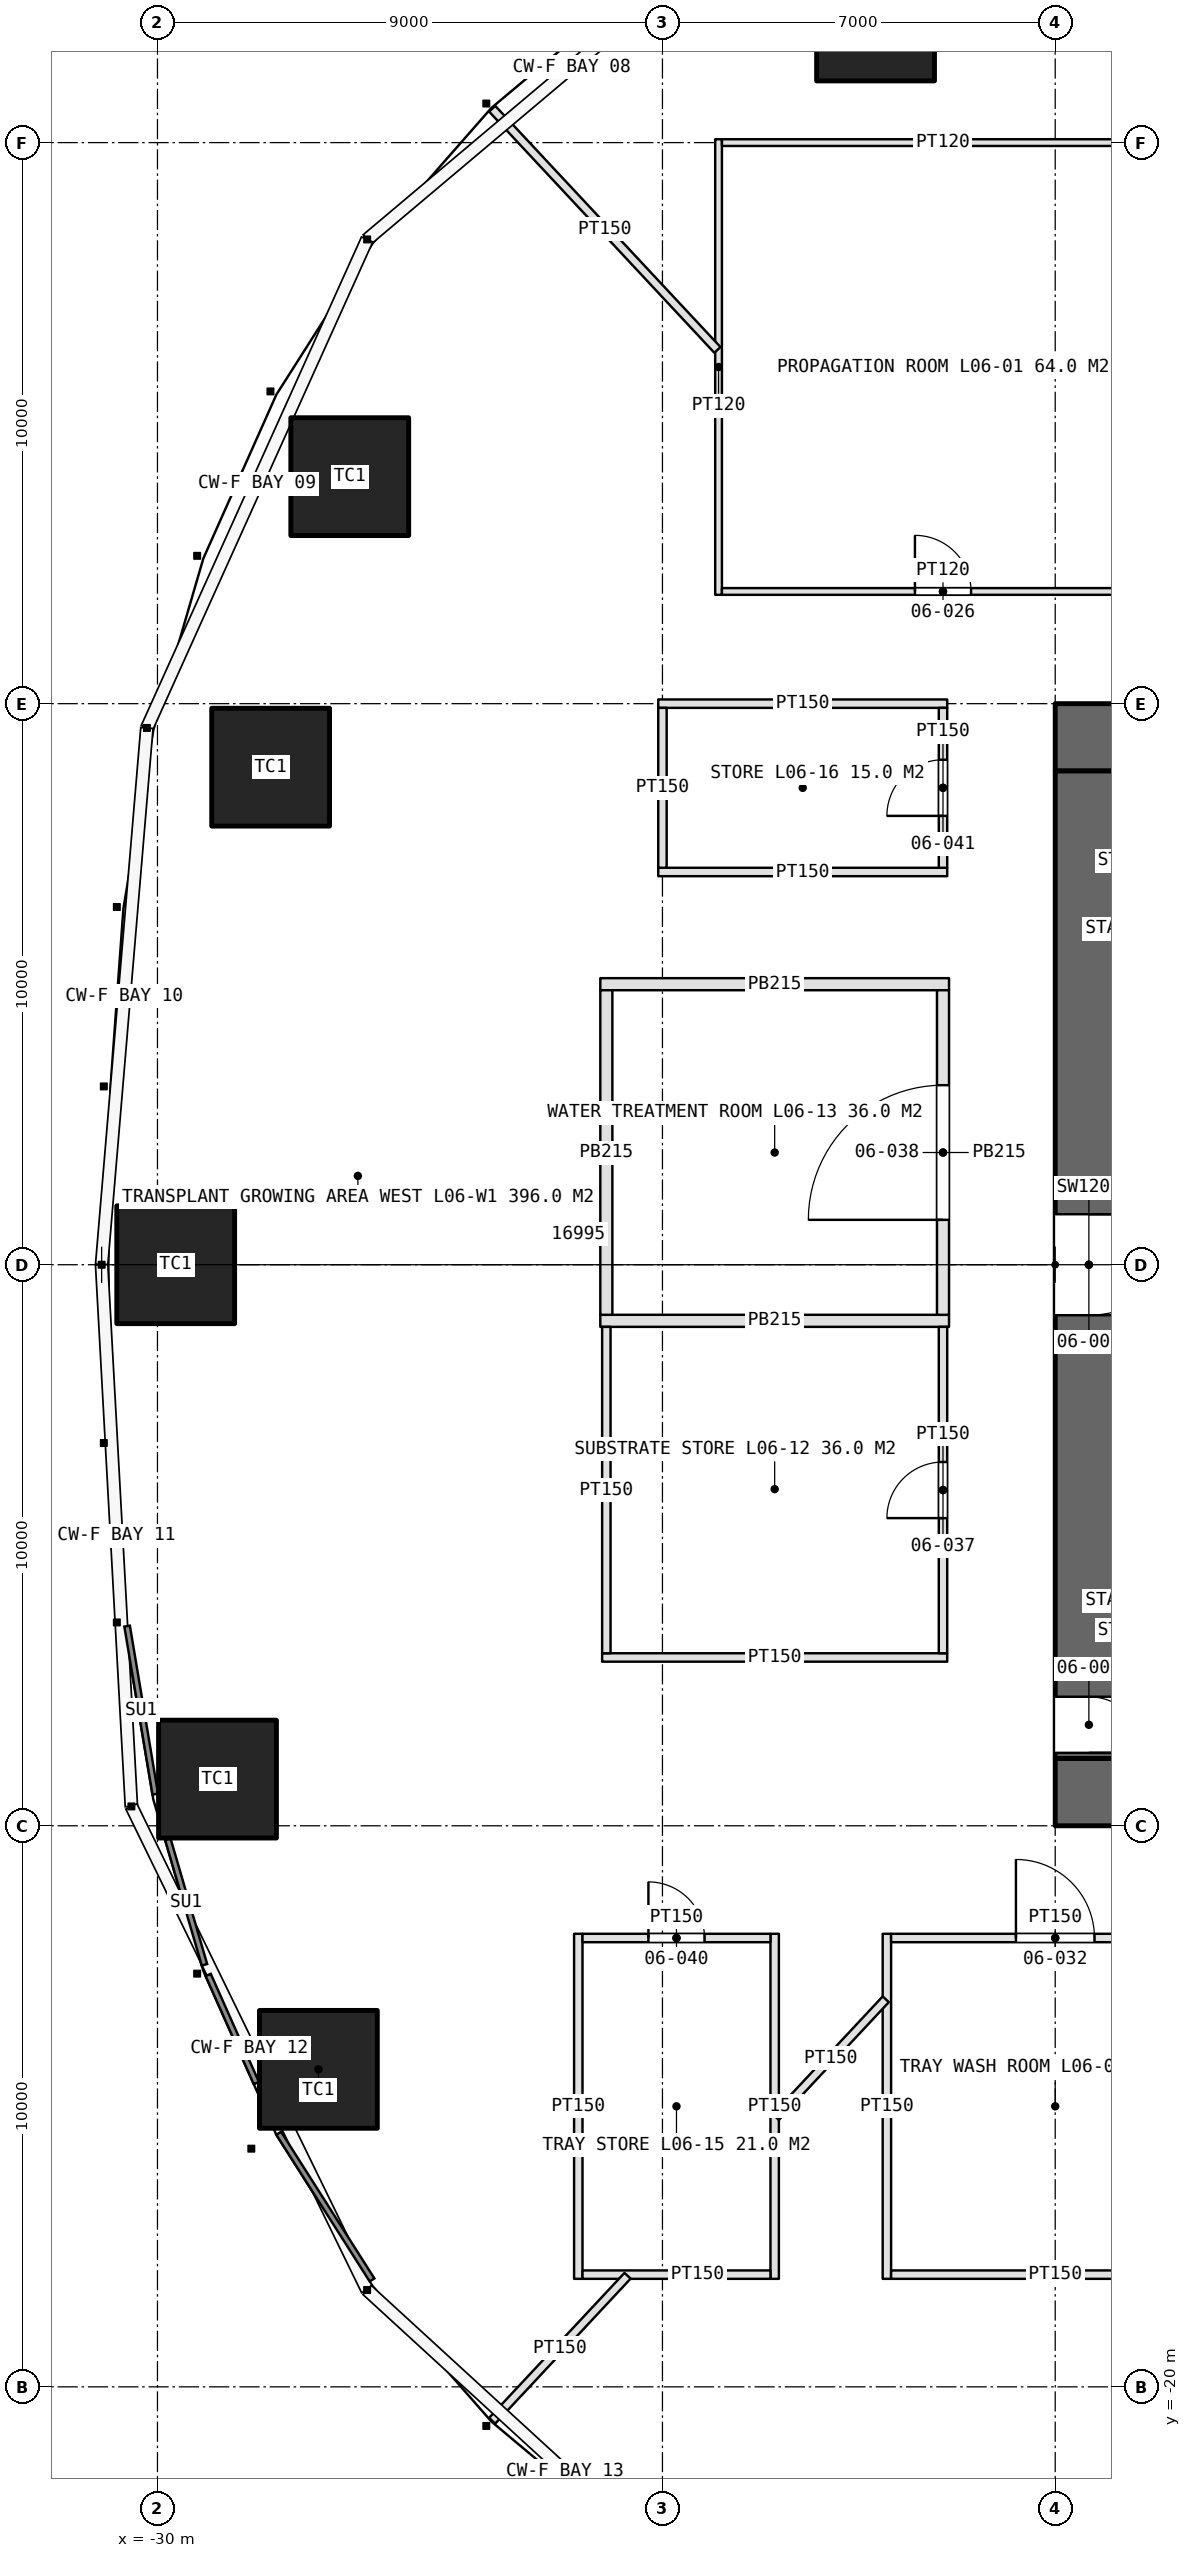
"""IFC4 building model, lengths in metres.
Left out: names, types, materials, properties, quantities, classifications, styles, units other than length and angle.
Written with IfcOpenShell. Run it as: python <this file> out.ifc"""

import sys

from ifc_helpers import new_model, si_unit, direction, frame, frame_2d, origin, origin_2d, place, context, subcontext, project, spatial, rectangle, extrude, element, fill, save


model = new_model("IFC4")
c1 = context("Model", 3, precision=1e-05, world=origin(), true_north=direction((0.0, 1.0)))
c2 = subcontext(c1, "Body", "Model", "MODEL_VIEW")
j1 = project(units=[si_unit("LENGTHUNIT", "METRE"), si_unit("PLANEANGLEUNIT", "RADIAN")], contexts=[c1])
p1 = place(None, origin())
s1 = spatial("IfcSite", under=j1, at=p1, CompositionType="ELEMENT")
p2 = place(p1, origin())
s2 = spatial("IfcBuilding", under=s1, at=p2, CompositionType="ELEMENT")
p3 = place(p2, frame((0.0, 0.0, 30.0)))
s3 = spatial("IfcBuildingStorey", under=s2, at=p3, CompositionType="ELEMENT", Elevation=30.0)
p4 = place(p3, frame((-14.0, -9.4, 0.0), z_axis=(0.0, 0.0, 1.0), x_axis=(1.0, 0.0, 0.0)))
e1 = element("IfcWall", 1, at=p4, inside=s3, PredefinedType="SHEAR", context=c2, shape_type="SweptSolid", body=[
    extrude(rectangle(XDim=28.0, YDim=1.2, at=frame_2d((14.0, 0.0))), origin(), (0.0, 0.0, 1.0), 5.0),
])
p5 = place(p4, frame((13.1, 0.0, 0.0)))
e2 = element("IfcOpeningElement", 2, at=p5, cuts=e1, PredefinedType="OPENING", context=c2, shape_type="SweptSolid", body=[
    extrude(rectangle(XDim=1.8, YDim=2.4, at=frame_2d((0.9, 1.2))), frame((0.0, 0.61, 0.0), z_axis=(0.0, -1.0, 0.0), x_axis=(1.0, 0.0, 0.0)), (0.0, 0.0, 1.0), 1.22),
])
p6 = place(p4, frame((22.9, 0.0, 0.0)))
e3 = element("IfcOpeningElement", 3, at=p6, cuts=e1, PredefinedType="OPENING", context=c2, shape_type="SweptSolid", body=[
    extrude(rectangle(XDim=2.2, YDim=2.7, at=frame_2d((1.1, 1.35))), frame((0.0, 0.61, 0.0), z_axis=(0.0, -1.0, 0.0), x_axis=(1.0, 0.0, 0.0)), (0.0, 0.0, 1.0), 1.22),
])
p7 = place(p3, frame((14.0, 9.4, 0.0), z_axis=(0.0, 0.0, 1.0), x_axis=(-1.0, 0.0, 0.0)))
e4 = element("IfcWall", 4, at=p7, inside=s3, PredefinedType="SHEAR", context=c2, shape_type="SweptSolid", body=[
    extrude(rectangle(XDim=28.0, YDim=1.2, at=frame_2d((14.0, 0.0))), origin(), (0.0, 0.0, 1.0), 5.0),
])
p8 = place(p7, frame((24.0, 0.0, 0.0)))
e5 = element("IfcOpeningElement", 5, at=p8, cuts=e4, PredefinedType="OPENING", context=c2, shape_type="SweptSolid", body=[
    extrude(rectangle(XDim=1.0, YDim=2.4, at=frame_2d((0.5, 1.2))), frame((0.0, 0.61, 0.0), z_axis=(0.0, -1.0, 0.0), x_axis=(1.0, 0.0, 0.0)), (0.0, 0.0, 1.0), 1.22),
])
p9 = place(p7, frame((13.1, 0.0, 0.0)))
e6 = element("IfcOpeningElement", 6, at=p9, cuts=e4, PredefinedType="OPENING", context=c2, shape_type="SweptSolid", body=[
    extrude(rectangle(XDim=1.8, YDim=2.4, at=frame_2d((0.9, 1.2))), frame((0.0, 0.61, 0.0), z_axis=(0.0, -1.0, 0.0), x_axis=(1.0, 0.0, 0.0)), (0.0, 0.0, 1.0), 1.22),
])
p10 = place(p3, frame((-13.4, 8.8, 0.0), z_axis=(0.0, 0.0, 1.0), x_axis=(0.0, -1.0, 0.0)))
e7 = element("IfcWall", 7, at=p10, inside=s3, PredefinedType="SHEAR", context=c2, shape_type="SweptSolid", body=[
    extrude(rectangle(XDim=17.6, YDim=1.2, at=frame_2d((8.8, 0.0))), origin(), (0.0, 0.0, 1.0), 5.0),
])
p11 = place(p10, frame((7.9, 0.0, 0.0)))
e8 = element("IfcOpeningElement", 8, at=p11, cuts=e7, PredefinedType="OPENING", context=c2, shape_type="SweptSolid", body=[
    extrude(rectangle(XDim=1.8, YDim=2.4, at=frame_2d((0.9, 1.2))), frame((0.0, 0.61, 0.0), z_axis=(0.0, -1.0, 0.0), x_axis=(1.0, 0.0, 0.0)), (0.0, 0.0, 1.0), 1.22),
])
p12 = place(p10, frame((16.5, 0.0, 0.0)))
e9 = element("IfcOpeningElement", 9, at=p12, cuts=e7, PredefinedType="OPENING", context=c2, shape_type="SweptSolid", body=[
    extrude(rectangle(XDim=1.0, YDim=2.4, at=frame_2d((0.5, 1.2))), frame((0.0, 0.61, 0.0), z_axis=(0.0, -1.0, 0.0), x_axis=(1.0, 0.0, 0.0)), (0.0, 0.0, 1.0), 1.22),
])
for number, where, z_axis, x_axis in (
    (10, (-17.202, 22.15, 0.0), (0.0, 0.0, 1.0), (1.0, 0.0, 0.0)),
    (11, (-26.573, 14.046, 0.0), (0.0, 0.0, 1.0), (1.0, 0.0, 0.0)),
    (12, (-27.983, 8.868, 0.0), (0.0, 0.0, 1.0), (1.0, 0.0, 0.0)),
    (13, (-29.675, 0.0, 0.0), (0.0, 0.0, 1.0), (1.0, 0.0, 0.0)),
    (14, (-28.93, -9.168, 0.0), (0.0, 0.0, 1.0), (1.0, 0.0, 0.0)),
    (15, (-27.132, -14.341, 0.0), (0.0, 0.0, 1.0), (1.0, 0.0, 0.0)),
):
    element("IfcColumn", number, at=place(p3, frame(where, z_axis=z_axis, x_axis=x_axis)), inside=s3, PredefinedType="COLUMN", context=c2, shape_type="SweptSolid", body=[
        extrude(rectangle(XDim=2.1, YDim=2.1, at=origin_2d()), origin(), (0.0, 0.0, 1.0), 5.0),
    ])
p13 = place(p3, frame((-20.0, 11.94, 0.0), z_axis=(0.0, 0.0, 1.0), x_axis=(0.0, 1.0, 0.0)))
e16 = element("IfcWall", 16, at=p13, inside=s3, PredefinedType="PARTITIONING", context=c2, shape_type="SweptSolid", body=[
    extrude(rectangle(XDim=8.12, YDim=0.12, at=frame_2d((4.06, 0.0))), origin(), (0.0, 0.0, 1.0), 3.6),
])
p14 = place(p3, frame((-19.94, 12.0, 0.0), z_axis=(0.0, 0.0, 1.0), x_axis=(1.0, 0.0, 0.0)))
e17 = element("IfcWall", 17, at=p14, inside=s3, PredefinedType="PARTITIONING", context=c2, shape_type="SweptSolid", body=[
    extrude(rectangle(XDim=7.88, YDim=0.12, at=frame_2d((3.94, 0.0))), origin(), (0.0, 0.0, 1.0), 3.6),
])
p15 = place(p14, frame((3.44, 0.0, 0.0)))
e18 = element("IfcOpeningElement", 18, at=p15, cuts=e17, PredefinedType="OPENING", context=c2, shape_type="SweptSolid", body=[
    extrude(rectangle(XDim=1.0, YDim=2.2, at=frame_2d((0.5, 1.1))), frame((0.0, 0.07, 0.0), z_axis=(0.0, -1.0, 0.0), x_axis=(1.0, 0.0, 0.0)), (0.0, 0.0, 1.0), 0.14),
])
p16 = place(p3, frame((-19.94, 20.0, 0.0), z_axis=(0.0, 0.0, 1.0), x_axis=(1.0, 0.0, 0.0)))
e19 = element("IfcWall", 19, at=p16, inside=s3, PredefinedType="PARTITIONING", context=c2, shape_type="SweptSolid", body=[
    extrude(rectangle(XDim=7.88, YDim=0.12, at=frame_2d((3.94, 0.0))), origin(), (0.0, 0.0, 1.0), 3.6),
])
p17 = place(p3, frame((-17.0, -11.925, 0.0), z_axis=(0.0, 0.0, 1.0), x_axis=(0.0, -1.0, 0.0)))
e20 = element("IfcWall", 20, at=p17, inside=s3, PredefinedType="PARTITIONING", context=c2, shape_type="SweptSolid", body=[
    extrude(rectangle(XDim=6.15, YDim=0.15, at=frame_2d((3.075, 0.0))), origin(), (0.0, 0.0, 1.0), 3.6),
])
p18 = place(p3, frame((-16.925, -12.0, 0.0), z_axis=(0.0, 0.0, 1.0), x_axis=(1.0, 0.0, 0.0)))
e21 = element("IfcWall", 21, at=p18, inside=s3, PredefinedType="PARTITIONING", context=c2, shape_type="SweptSolid", body=[
    extrude(rectangle(XDim=5.85, YDim=0.15, at=frame_2d((2.925, 0.0))), origin(), (0.0, 0.0, 1.0), 3.6),
])
p19 = place(p18, frame((2.225, 0.0, 0.0)))
e22 = element("IfcOpeningElement", 22, at=p19, cuts=e21, PredefinedType="OPENING", context=c2, shape_type="SweptSolid", body=[
    extrude(rectangle(XDim=1.4, YDim=2.4, at=frame_2d((0.7, 1.2))), frame((0.0, 0.085, 0.0), z_axis=(0.0, -1.0, 0.0), x_axis=(1.0, 0.0, 0.0)), (0.0, 0.0, 1.0), 0.17),
])
p20 = place(p3, frame((-16.925, -18.0, 0.0), z_axis=(0.0, 0.0, 1.0), x_axis=(1.0, 0.0, 0.0)))
e23 = element("IfcWall", 23, at=p20, inside=s3, PredefinedType="PARTITIONING", context=c2, shape_type="SweptSolid", body=[
    extrude(rectangle(XDim=5.85, YDim=0.15, at=frame_2d((2.925, 0.0))), origin(), (0.0, 0.0, 1.0), 3.6),
])
p21 = place(p3, frame((-15.925, -7.0, 0.0), z_axis=(0.0, 0.0, 1.0), x_axis=(-1.0, 0.0, 0.0)))
e24 = element("IfcWall", 24, at=p21, inside=s3, PredefinedType="PARTITIONING", context=c2, shape_type="SweptSolid", body=[
    extrude(rectangle(XDim=6.15, YDim=0.15, at=frame_2d((3.075, 0.0))), origin(), (0.0, 0.0, 1.0), 3.6),
])
for number, where, z_axis, x_axis in (
    (25, (-15.893, -1.0, 0.0), (0.0, 0.0, 1.0), (-1.0, 0.0, 0.0)),
    (26, (-15.893, 5.0, 0.0), (0.0, 0.0, 1.0), (-1.0, 0.0, 0.0)),
):
    element("IfcWall", number, at=place(p3, frame(where, z_axis=z_axis, x_axis=x_axis)), inside=s3, PredefinedType="PARTITIONING", context=c2, shape_type="SweptSolid", body=[
        extrude(rectangle(XDim=6.215, YDim=0.215, at=frame_2d((3.107, 0.0))), origin(), (0.0, 0.0, 1.0), 3.6),
    ])
p22 = place(p3, frame((-16.0, -6.925, 0.0), z_axis=(0.0, 0.0, 1.0), x_axis=(0.0, 1.0, 0.0)))
e27 = element("IfcWall", 27, at=p22, inside=s3, PredefinedType="PARTITIONING", context=c2, shape_type="SweptSolid", body=[
    extrude(rectangle(XDim=5.818, YDim=0.15, at=frame_2d((2.909, 0.0))), origin(), (0.0, 0.0, 1.0), 3.6),
])
p23 = place(p22, frame((2.409, 0.0, 0.0)))
e28 = element("IfcOpeningElement", 28, at=p23, cuts=e27, PredefinedType="OPENING", context=c2, shape_type="SweptSolid", body=[
    extrude(rectangle(XDim=1.0, YDim=2.2, at=frame_2d((0.5, 1.1))), frame((0.0, 0.085, 0.0), z_axis=(0.0, -1.0, 0.0), x_axis=(1.0, 0.0, 0.0)), (0.0, 0.0, 1.0), 0.17),
])
p24 = place(p3, frame((-22.0, -6.925, 0.0), z_axis=(0.0, 0.0, 1.0), x_axis=(0.0, 1.0, 0.0)))
e29 = element("IfcWall", 29, at=p24, inside=s3, PredefinedType="PARTITIONING", context=c2, shape_type="SweptSolid", body=[
    extrude(rectangle(XDim=5.818, YDim=0.15, at=frame_2d((2.909, 0.0))), origin(), (0.0, 0.0, 1.0), 3.6),
])
p25 = place(p3, frame((-16.0, -0.893, 0.0), z_axis=(0.0, 0.0, 1.0), x_axis=(0.0, 1.0, 0.0)))
e30 = element("IfcWall", 30, at=p25, inside=s3, PredefinedType="PARTITIONING", context=c2, shape_type="SweptSolid", body=[
    extrude(rectangle(XDim=5.785, YDim=0.215, at=frame_2d((2.893, 0.0))), origin(), (0.0, 0.0, 1.0), 3.6),
])
p26 = place(p25, frame((1.692, 0.0, 0.0)))
e31 = element("IfcOpeningElement", 31, at=p26, cuts=e30, PredefinedType="OPENING", context=c2, shape_type="SweptSolid", body=[
    extrude(rectangle(XDim=2.4, YDim=2.4, at=frame_2d((1.2, 1.2))), frame((0.0, 0.118, 0.0), z_axis=(0.0, -1.0, 0.0), x_axis=(1.0, 0.0, 0.0)), (0.0, 0.0, 1.0), 0.235),
])
p27 = place(p3, frame((-22.0, -0.893, 0.0), z_axis=(0.0, 0.0, 1.0), x_axis=(0.0, 1.0, 0.0)))
e32 = element("IfcWall", 32, at=p27, inside=s3, PredefinedType="PARTITIONING", context=c2, shape_type="SweptSolid", body=[
    extrude(rectangle(XDim=5.785, YDim=0.215, at=frame_2d((2.893, 0.0))), origin(), (0.0, 0.0, 1.0), 3.6),
])
for number, where, z_axis, x_axis in (
    (33, (-22.5, -11.925, 0.0), (0.0, 0.0, 1.0), (0.0, -1.0, 0.0)),
    (34, (-19.0, -11.925, 0.0), (0.0, 0.0, 1.0), (0.0, -1.0, 0.0)),
):
    element("IfcWall", number, at=place(p3, frame(where, z_axis=z_axis, x_axis=x_axis)), inside=s3, PredefinedType="PARTITIONING", context=c2, shape_type="SweptSolid", body=[
        extrude(rectangle(XDim=6.15, YDim=0.15, at=frame_2d((3.075, 0.0))), origin(), (0.0, 0.0, 1.0), 3.6),
    ])
p28 = place(p3, frame((-22.425, -12.0, 0.0), z_axis=(0.0, 0.0, 1.0), x_axis=(1.0, 0.0, 0.0)))
e35 = element("IfcWall", 35, at=p28, inside=s3, PredefinedType="PARTITIONING", context=c2, shape_type="SweptSolid", body=[
    extrude(rectangle(XDim=3.35, YDim=0.15, at=frame_2d((1.675, 0.0))), origin(), (0.0, 0.0, 1.0), 3.6),
])
p29 = place(p28, frame((1.175, 0.0, 0.0)))
e36 = element("IfcOpeningElement", 36, at=p29, cuts=e35, PredefinedType="OPENING", context=c2, shape_type="SweptSolid", body=[
    extrude(rectangle(XDim=1.0, YDim=2.2, at=frame_2d((0.5, 1.1))), frame((0.0, 0.085, 0.0), z_axis=(0.0, -1.0, 0.0), x_axis=(1.0, 0.0, 0.0)), (0.0, 0.0, 1.0), 0.17),
])
p30 = place(p3, frame((-22.425, -18.0, 0.0), z_axis=(0.0, 0.0, 1.0), x_axis=(1.0, 0.0, 0.0)))
e37 = element("IfcWall", 37, at=p30, inside=s3, PredefinedType="PARTITIONING", context=c2, shape_type="SweptSolid", body=[
    extrude(rectangle(XDim=3.35, YDim=0.15, at=frame_2d((1.675, 0.0))), origin(), (0.0, 0.0, 1.0), 3.6),
])
for number, where, z_axis, x_axis in (
    (38, (-15.925, 7.0, 0.0), (0.0, 0.0, 1.0), (-1.0, 0.0, 0.0)),
    (39, (-15.925, 10.0, 0.0), (0.0, 0.0, 1.0), (-1.0, 0.0, 0.0)),
):
    element("IfcWall", number, at=place(p3, frame(where, z_axis=z_axis, x_axis=x_axis)), inside=s3, PredefinedType="PARTITIONING", context=c2, shape_type="SweptSolid", body=[
        extrude(rectangle(XDim=5.15, YDim=0.15, at=frame_2d((2.575, 0.0))), origin(), (0.0, 0.0, 1.0), 3.6),
    ])
p31 = place(p3, frame((-16.0, 7.075, 0.0), z_axis=(0.0, 0.0, 1.0), x_axis=(0.0, 1.0, 0.0)))
e40 = element("IfcWall", 40, at=p31, inside=s3, PredefinedType="PARTITIONING", context=c2, shape_type="SweptSolid", body=[
    extrude(rectangle(XDim=2.85, YDim=0.15, at=frame_2d((1.425, 0.0))), origin(), (0.0, 0.0, 1.0), 3.6),
])
p32 = place(p31, frame((0.925, 0.0, 0.0)))
e41 = element("IfcOpeningElement", 41, at=p32, cuts=e40, PredefinedType="OPENING", context=c2, shape_type="SweptSolid", body=[
    extrude(rectangle(XDim=1.0, YDim=2.2, at=frame_2d((0.5, 1.1))), frame((0.0, 0.085, 0.0), z_axis=(0.0, -1.0, 0.0), x_axis=(1.0, 0.0, 0.0)), (0.0, 0.0, 1.0), 0.17),
])
p33 = place(p3, frame((-21.0, 7.075, 0.0), z_axis=(0.0, 0.0, 1.0), x_axis=(0.0, 1.0, 0.0)))
e42 = element("IfcWall", 42, at=p33, inside=s3, PredefinedType="PARTITIONING", context=c2, shape_type="SweptSolid", body=[
    extrude(rectangle(XDim=2.85, YDim=0.15, at=frame_2d((1.425, 0.0))), origin(), (0.0, 0.0, 1.0), 3.6),
])
p34 = place(p3, frame((-21.622, -18.02, 0.0), z_axis=(0.0, 0.0, 1.0), x_axis=(-0.682522451791, -0.730864626864, 0.0)))
e43 = element("IfcWall", 43, at=p34, inside=s3, PredefinedType="PARTITIONING", context=c2, shape_type="SweptSolid", body=[
    extrude(rectangle(XDim=3.535, YDim=0.15, at=frame_2d((1.768, 0.0))), origin(), (0.0, 0.0, 1.0), 3.6),
])
p35 = place(p3, frame((-17.02, -13.092, 0.0), z_axis=(0.0, 0.0, 1.0), x_axis=(-0.682506029746, -0.730879962347, 0.0)))
e44 = element("IfcWall", 44, at=p35, inside=s3, PredefinedType="PARTITIONING", context=c2, shape_type="SweptSolid", body=[
    extrude(rectangle(XDim=2.872, YDim=0.15, at=frame_2d((1.436, 0.0))), origin(), (0.0, 0.0, 1.0), 3.6),
])
p36 = place(p3, frame((-20.02, 16.305, 0.0), z_axis=(0.0, 0.0, 1.0), x_axis=(-0.682516386928, 0.730870290527, 0.0)))
e45 = element("IfcWall", 45, at=p36, inside=s3, PredefinedType="PARTITIONING", context=c2, shape_type="SweptSolid", body=[
    extrude(rectangle(XDim=5.882, YDim=0.15, at=frame_2d((2.941, 0.0))), origin(), (0.0, 0.0, 1.0), 3.6),
])
p37 = place(p11, origin())
e46 = element("IfcDoor", 46, at=p37, inside=s3, OperationType="DOUBLE_DOOR_SINGLE_SWING", PredefinedType="DOOR", context=c2, shape_type="SweptSolid", body=[
    extrude(rectangle(XDim=1.8, YDim=2.4, at=frame_2d((0.9, 1.2))), frame((0.0, 0.025, 0.0), z_axis=(0.0, -1.0, 0.0), x_axis=(1.0, 0.0, 0.0)), (0.0, 0.0, 1.0), 0.05),
])
fill(e8, e46)
p38 = place(p12, origin())
e47 = element("IfcDoor", 47, at=p38, inside=s3, OperationType="SINGLE_SWING_RIGHT", PredefinedType="DOOR", context=c2, shape_type="SweptSolid", body=[
    extrude(rectangle(XDim=1.0, YDim=2.4, at=frame_2d((0.5, 1.2))), frame((0.0, 0.025, 0.0), z_axis=(0.0, -1.0, 0.0), x_axis=(1.0, 0.0, 0.0)), (0.0, 0.0, 1.0), 0.05),
])
fill(e9, e47)
p39 = place(p15, origin())
e48 = element("IfcDoor", 48, at=p39, inside=s3, OperationType="SINGLE_SWING_LEFT", PredefinedType="DOOR", context=c2, shape_type="SweptSolid", body=[
    extrude(rectangle(XDim=1.0, YDim=2.2, at=frame_2d((0.5, 1.1))), frame((0.0, 0.025, 0.0), z_axis=(0.0, -1.0, 0.0), x_axis=(1.0, 0.0, 0.0)), (0.0, 0.0, 1.0), 0.05),
])
fill(e18, e48)
p40 = place(p19, origin())
e49 = element("IfcDoor", 49, at=p40, inside=s3, OperationType="DOUBLE_DOOR_DOUBLE_SWING", PredefinedType="DOOR", context=c2, shape_type="SweptSolid", body=[
    extrude(rectangle(XDim=1.4, YDim=2.4, at=frame_2d((0.7, 1.2))), frame((0.0, 0.025, 0.0), z_axis=(0.0, -1.0, 0.0), x_axis=(1.0, 0.0, 0.0)), (0.0, 0.0, 1.0), 0.05),
])
fill(e22, e49)
p41 = place(p23, origin())
e50 = element("IfcDoor", 50, at=p41, inside=s3, OperationType="SINGLE_SWING_LEFT", PredefinedType="DOOR", context=c2, shape_type="SweptSolid", body=[
    extrude(rectangle(XDim=1.0, YDim=2.2, at=frame_2d((0.5, 1.1))), frame((0.0, 0.025, 0.0), z_axis=(0.0, -1.0, 0.0), x_axis=(1.0, 0.0, 0.0)), (0.0, 0.0, 1.0), 0.05),
])
fill(e28, e50)
p42 = place(p26, origin())
e51 = element("IfcDoor", 51, at=p42, inside=s3, OperationType="DOUBLE_DOOR_SINGLE_SWING", PredefinedType="DOOR", context=c2, shape_type="SweptSolid", body=[
    extrude(rectangle(XDim=2.4, YDim=2.4, at=frame_2d((1.2, 1.2))), frame((0.0, 0.025, 0.0), z_axis=(0.0, -1.0, 0.0), x_axis=(1.0, 0.0, 0.0)), (0.0, 0.0, 1.0), 0.05),
])
fill(e31, e51)
p43 = place(p29, origin())
e52 = element("IfcDoor", 52, at=p43, inside=s3, OperationType="SINGLE_SWING_LEFT", PredefinedType="DOOR", context=c2, shape_type="SweptSolid", body=[
    extrude(rectangle(XDim=1.0, YDim=2.2, at=frame_2d((0.5, 1.1))), frame((0.0, 0.025, 0.0), z_axis=(0.0, -1.0, 0.0), x_axis=(1.0, 0.0, 0.0)), (0.0, 0.0, 1.0), 0.05),
])
fill(e36, e52)
p44 = place(p32, origin())
e53 = element("IfcDoor", 53, at=p44, inside=s3, OperationType="SINGLE_SWING_LEFT", PredefinedType="DOOR", context=c2, shape_type="SweptSolid", body=[
    extrude(rectangle(XDim=1.0, YDim=2.2, at=frame_2d((0.5, 1.1))), frame((0.0, 0.025, 0.0), z_axis=(0.0, -1.0, 0.0), x_axis=(1.0, 0.0, 0.0)), (0.0, 0.0, 1.0), 0.05),
])
fill(e41, e53)
save(model, sys.argv[1])
